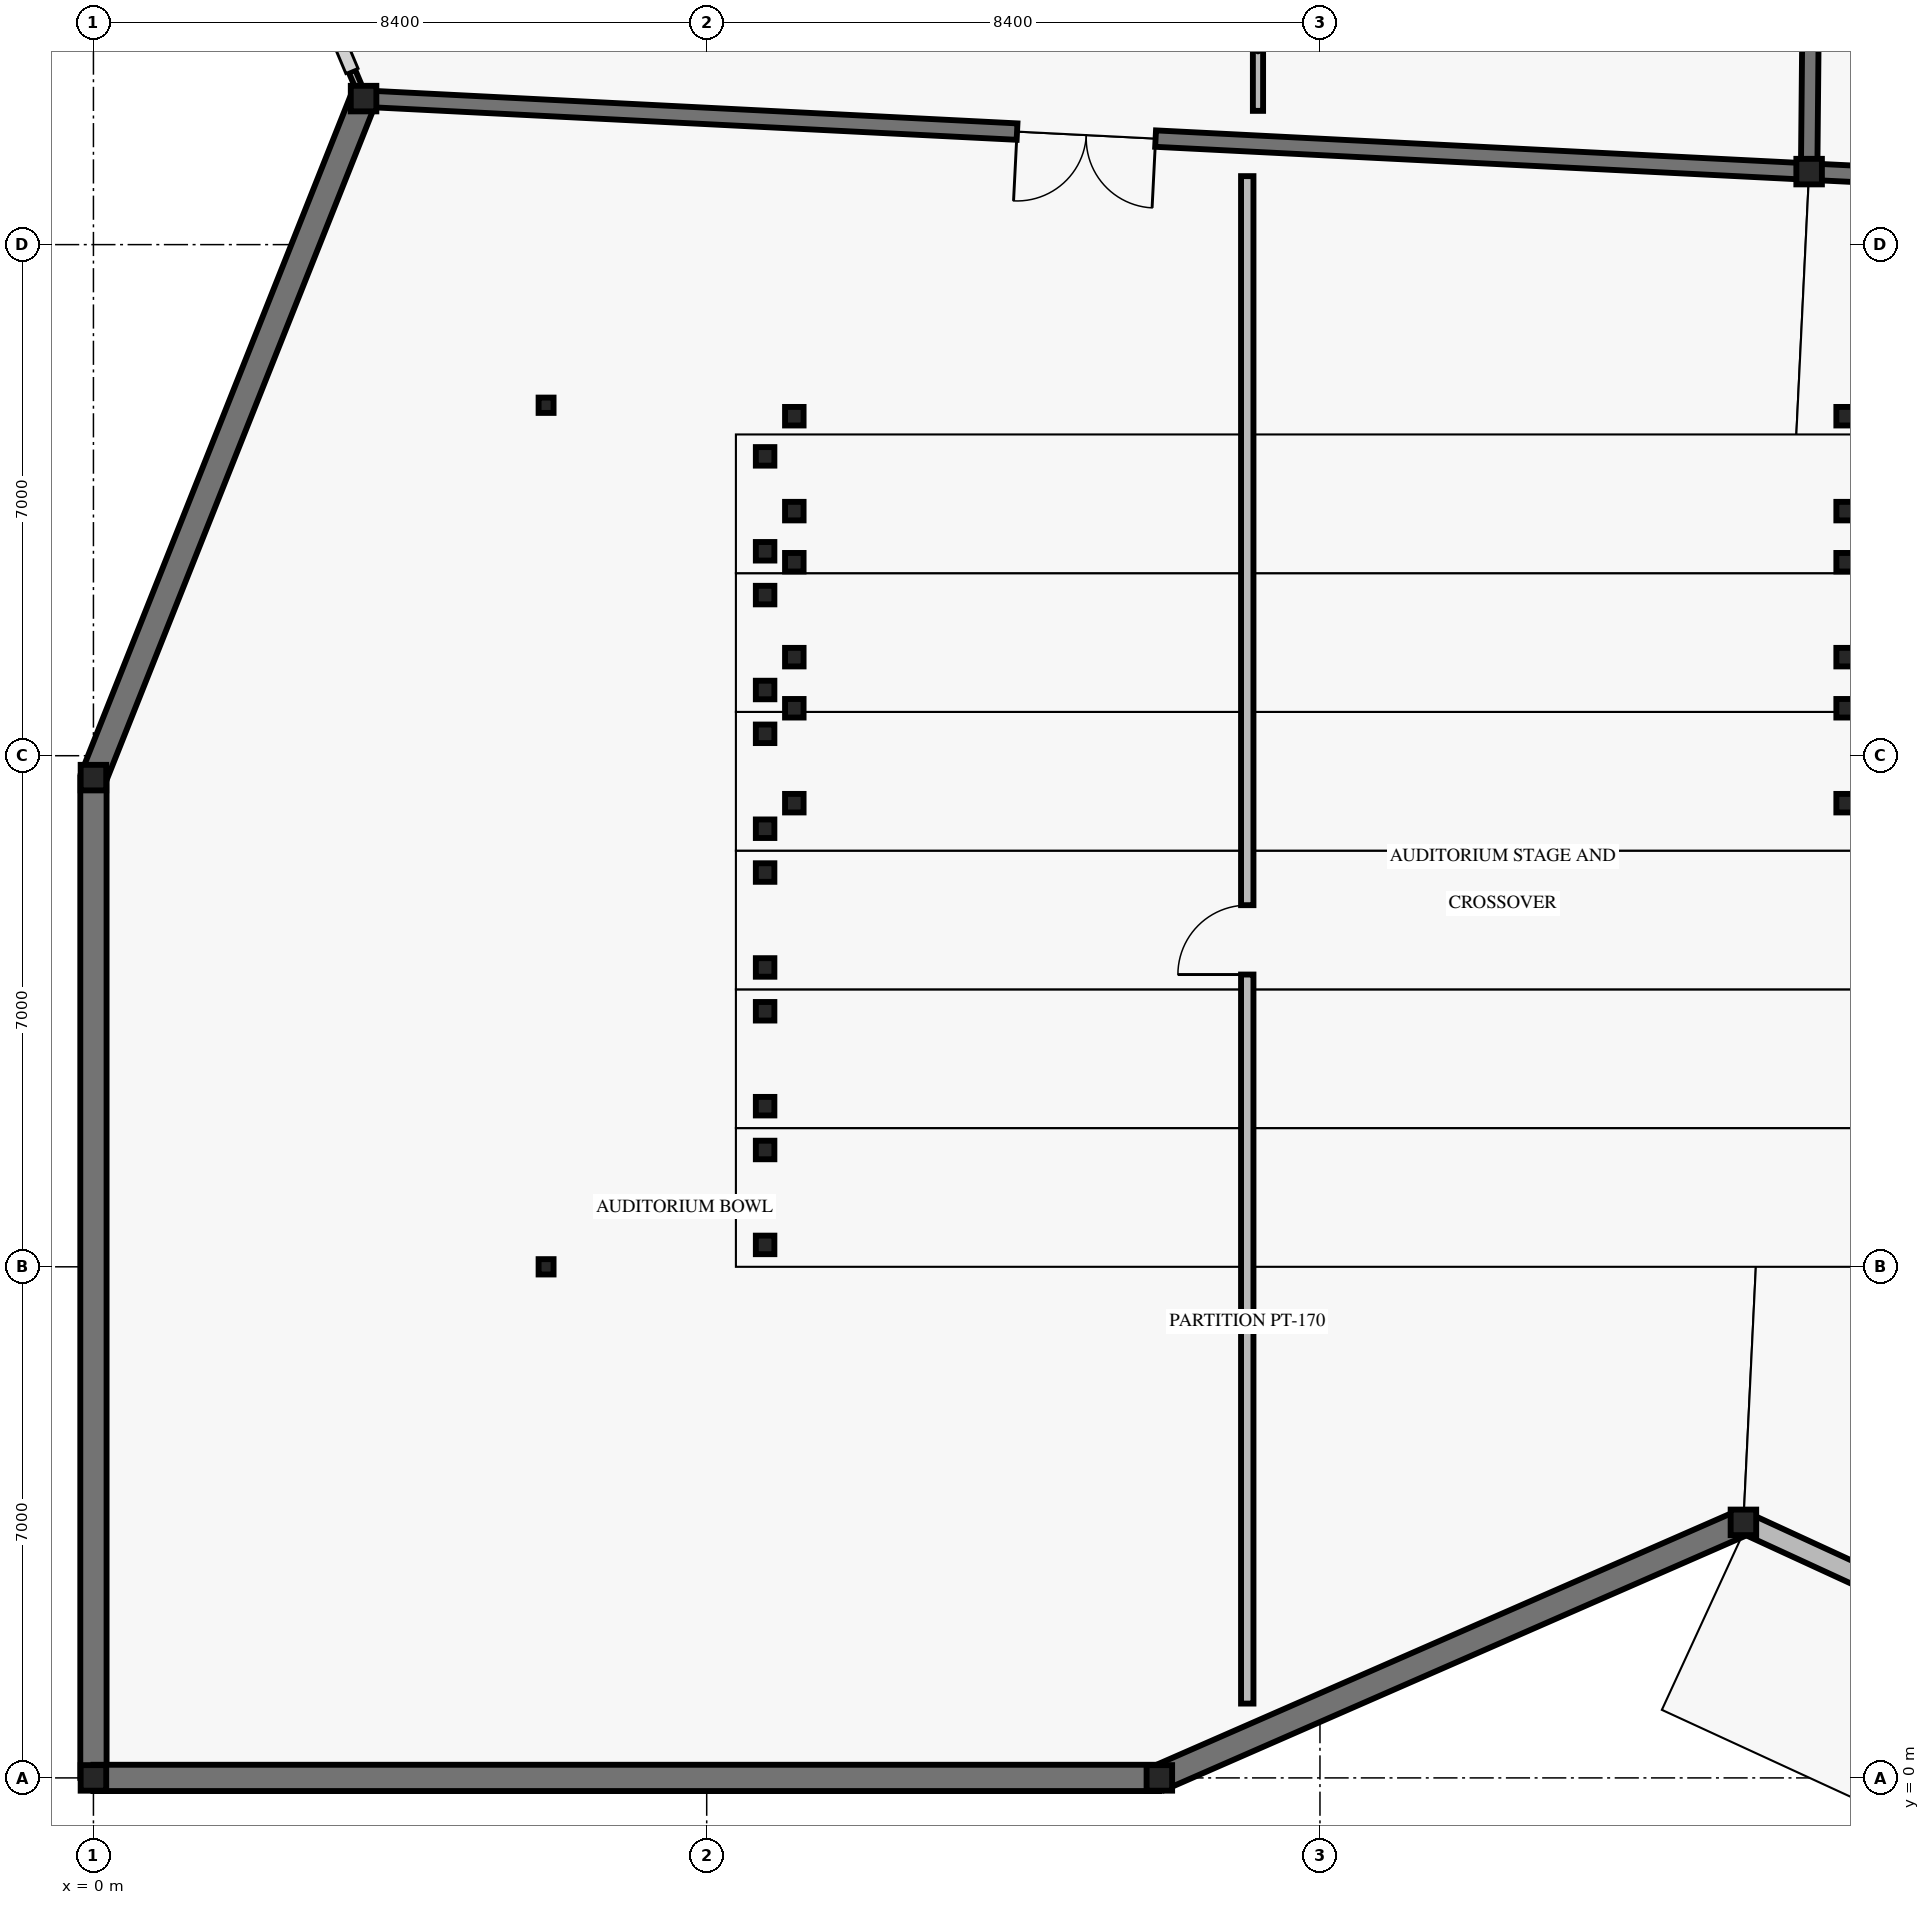
"""IFC4 building model, lengths in metres.
Left out: names, types, materials, properties, quantities, classifications, styles, units other than length and angle.
Written with IfcOpenShell. Run it as: python <this file> out.ifc"""

import sys

from ifc_helpers import new_model, si_unit, direction, frame, frame_2d, origin, origin_2d, place, context, subcontext, project, spatial, rectangle, i_section, extrude, element, fill, save


model = new_model("IFC4")
c1 = context("Model", 3, precision=1e-05, world=origin(), true_north=direction((0.0, 1.0)))
c2 = subcontext(c1, "Body", "Model", "MODEL_VIEW")
j1 = project(units=[si_unit("LENGTHUNIT", "METRE"), si_unit("PLANEANGLEUNIT", "RADIAN")], contexts=[c1])
p1 = place(None, origin())
s1 = spatial("IfcSite", under=j1, at=p1, CompositionType="ELEMENT")
p2 = place(p1, origin())
s2 = spatial("IfcBuilding", under=s1, at=p2, CompositionType="ELEMENT")
p3 = place(p2, origin())
s3 = spatial("IfcBuildingStorey", under=s2, at=p3, CompositionType="ELEMENT", Elevation=0.0)
for number, where, z_axis, x_axis in (
    (1, (0.0, 0.0, 0.0), (0.0, 0.0, 1.0), (1.0, 0.0, 0.0)),
    (2, (0.0, 13.7, 0.0), (0.0, 0.0, 1.0), (1.0, 0.0, 0.0)),
    (3, (3.7, 23.0, 0.0), (0.0, 0.0, 1.0), (1.0, 0.0, 0.0)),
    (4, (14.6, 0.0, 0.0), (0.0, 0.0, 1.0), (1.0, 0.0, 0.0)),
    (5, (22.6, 3.5, 0.0), (0.0, 0.0, 1.0), (1.0, 0.0, 0.0)),
    (6, (23.5, 22.0, 0.0), (0.0, 0.0, 1.0), (1.0, 0.0, 0.0)),
):
    element("IfcColumn", number, at=place(p3, frame(where, z_axis=z_axis, x_axis=x_axis)), inside=s3, PredefinedType="COLUMN", context=c2, shape_type="SweptSolid", body=[
        extrude(i_section(OverallWidth=0.35, OverallDepth=0.35, WebThickness=0.02, FlangeThickness=0.028, at=origin_2d()), origin(), (0.0, 0.0, 1.0), 5.4),
    ])
for number, where, z_axis, x_axis in (
    (7, (6.2, 7.0, 0.0), (0.0, 0.0, 1.0), (1.0, 0.0, 0.0)),
    (8, (6.2, 18.8, 0.0), (0.0, 0.0, 1.0), (1.0, 0.0, 0.0)),
):
    element("IfcColumn", number, at=place(p3, frame(where, z_axis=z_axis, x_axis=x_axis)), inside=s3, PredefinedType="COLUMN", context=c2, shape_type="SweptSolid", body=[
        extrude(i_section(OverallWidth=0.205, OverallDepth=0.21, WebThickness=0.009, FlangeThickness=0.014, FilletRadius=0.01, at=origin_2d()), origin(), (0.0, 0.0, 1.0), 5.4),
    ])
for number, where, z_axis, x_axis in (
    (9, (9.2, 7.3, 0.0), (0.0, 0.0, 1.0), (1.0, 0.0, 0.0)),
    (10, (9.2, 8.6, 0.0), (0.0, 0.0, 1.0), (1.0, 0.0, 0.0)),
):
    element("IfcColumn", number, at=place(p3, frame(where, z_axis=z_axis, x_axis=x_axis)), inside=s3, PredefinedType="COLUMN", context=c2, shape_type="SweptSolid", body=[
        extrude(i_section(OverallWidth=0.254, OverallDepth=0.254, WebThickness=0.009, FlangeThickness=0.014, FilletRadius=0.013, at=origin_2d()), origin(), (0.0, 0.0, 1.0), 0.255),
    ])
for number, where, z_axis, x_axis in (
    (11, (9.2, 9.2, 0.0), (0.0, 0.0, 1.0), (1.0, 0.0, 0.0)),
    (12, (9.2, 10.5, 0.0), (0.0, 0.0, 1.0), (1.0, 0.0, 0.0)),
):
    element("IfcColumn", number, at=place(p3, frame(where, z_axis=z_axis, x_axis=x_axis)), inside=s3, PredefinedType="COLUMN", context=c2, shape_type="SweptSolid", body=[
        extrude(i_section(OverallWidth=0.254, OverallDepth=0.254, WebThickness=0.009, FlangeThickness=0.014, FilletRadius=0.013, at=origin_2d()), origin(), (0.0, 0.0, 1.0), 0.675),
    ])
for number, where, z_axis, x_axis in (
    (13, (9.2, 11.1, 0.0), (0.0, 0.0, 1.0), (1.0, 0.0, 0.0)),
    (14, (9.2, 12.4, 0.0), (0.0, 0.0, 1.0), (1.0, 0.0, 0.0)),
):
    element("IfcColumn", number, at=place(p3, frame(where, z_axis=z_axis, x_axis=x_axis)), inside=s3, PredefinedType="COLUMN", context=c2, shape_type="SweptSolid", body=[
        extrude(i_section(OverallWidth=0.254, OverallDepth=0.254, WebThickness=0.009, FlangeThickness=0.014, FilletRadius=0.013, at=origin_2d()), origin(), (0.0, 0.0, 1.0), 1.095),
    ])
for number, where, z_axis, x_axis in (
    (15, (9.2, 13.0, 0.0), (0.0, 0.0, 1.0), (1.0, 0.0, 0.0)),
    (16, (9.2, 14.3, 0.0), (0.0, 0.0, 1.0), (1.0, 0.0, 0.0)),
):
    element("IfcColumn", number, at=place(p3, frame(where, z_axis=z_axis, x_axis=x_axis)), inside=s3, PredefinedType="COLUMN", context=c2, shape_type="SweptSolid", body=[
        extrude(i_section(OverallWidth=0.254, OverallDepth=0.254, WebThickness=0.009, FlangeThickness=0.014, FilletRadius=0.013, at=origin_2d()), origin(), (0.0, 0.0, 1.0), 1.515),
    ])
for number, where, z_axis, x_axis in (
    (17, (9.2, 14.9, 0.0), (0.0, 0.0, 1.0), (1.0, 0.0, 0.0)),
    (18, (9.2, 16.2, 0.0), (0.0, 0.0, 1.0), (1.0, 0.0, 0.0)),
):
    element("IfcColumn", number, at=place(p3, frame(where, z_axis=z_axis, x_axis=x_axis)), inside=s3, PredefinedType="COLUMN", context=c2, shape_type="SweptSolid", body=[
        extrude(i_section(OverallWidth=0.254, OverallDepth=0.254, WebThickness=0.009, FlangeThickness=0.014, FilletRadius=0.013, at=origin_2d()), origin(), (0.0, 0.0, 1.0), 1.935),
    ])
for number, where, z_axis, x_axis in (
    (19, (9.2, 16.8, 0.0), (0.0, 0.0, 1.0), (1.0, 0.0, 0.0)),
    (20, (9.2, 18.1, 0.0), (0.0, 0.0, 1.0), (1.0, 0.0, 0.0)),
):
    element("IfcColumn", number, at=place(p3, frame(where, z_axis=z_axis, x_axis=x_axis)), inside=s3, PredefinedType="COLUMN", context=c2, shape_type="SweptSolid", body=[
        extrude(i_section(OverallWidth=0.254, OverallDepth=0.254, WebThickness=0.009, FlangeThickness=0.014, FilletRadius=0.013, at=origin_2d()), origin(), (0.0, 0.0, 1.0), 2.355),
    ])
for number, where, z_axis, x_axis in (
    (21, (9.6, 13.35, 0.0), (0.0, 0.0, 1.0), (1.0, 0.0, 0.0)),
    (22, (9.6, 14.65, 0.0), (0.0, 0.0, 1.0), (1.0, 0.0, 0.0)),
    (23, (24.0, 13.35, 0.0), (0.0, 0.0, 1.0), (1.0, 0.0, 0.0)),
    (24, (24.0, 14.65, 0.0), (0.0, 0.0, 1.0), (1.0, 0.0, 0.0)),
    (25, (9.6, 15.35, 0.0), (0.0, 0.0, 1.0), (1.0, 0.0, 0.0)),
    (26, (9.6, 16.65, 0.0), (0.0, 0.0, 1.0), (1.0, 0.0, 0.0)),
    (27, (24.0, 15.35, 0.0), (0.0, 0.0, 1.0), (1.0, 0.0, 0.0)),
    (28, (24.0, 16.65, 0.0), (0.0, 0.0, 1.0), (1.0, 0.0, 0.0)),
    (29, (9.6, 17.35, 0.0), (0.0, 0.0, 1.0), (1.0, 0.0, 0.0)),
    (30, (9.6, 18.65, 0.0), (0.0, 0.0, 1.0), (1.0, 0.0, 0.0)),
    (31, (24.0, 17.35, 0.0), (0.0, 0.0, 1.0), (1.0, 0.0, 0.0)),
    (32, (24.0, 18.65, 0.0), (0.0, 0.0, 1.0), (1.0, 0.0, 0.0)),
):
    element("IfcColumn", number, at=place(p3, frame(where, z_axis=z_axis, x_axis=x_axis)), inside=s3, PredefinedType="COLUMN", context=c2, shape_type="SweptSolid", body=[
        extrude(i_section(OverallWidth=0.254, OverallDepth=0.254, WebThickness=0.009, FlangeThickness=0.014, FilletRadius=0.013, at=origin_2d()), origin(), (0.0, 0.0, 1.0), 5.4),
    ])
p4 = place(p3, frame((0.0, 13.7, 0.0), z_axis=(0.0, 0.0, 1.0), x_axis=(0.36968498985, 0.929157149399, 0.0)))
e33 = element("IfcWall", 33, at=p4, inside=s3, PredefinedType="SOLIDWALL", context=c2, shape_type="SweptSolid", body=[
    extrude(rectangle(XDim=9.949, YDim=0.36, at=frame_2d((4.975, 0.0))), origin(), (0.0, 0.0, 1.0), 4.22),
])
p5 = place(p3, frame((0.0, 0.0, 0.0), z_axis=(0.0, 0.0, 1.0), x_axis=(0.0, 1.0, 0.0)))
e34 = element("IfcWall", 34, at=p5, inside=s3, PredefinedType="SOLIDWALL", context=c2, shape_type="SweptSolid", body=[
    extrude(rectangle(XDim=13.7, YDim=0.36, at=frame_2d((6.85, 0.0))), origin(), (0.0, 0.0, 1.0), 4.22),
])
p6 = place(p3, frame((14.6, 0.0, 0.0), z_axis=(0.0, 0.0, 1.0), x_axis=(-1.0, 0.0, 0.0)))
e35 = element("IfcWall", 35, at=p6, inside=s3, PredefinedType="SOLIDWALL", context=c2, shape_type="SweptSolid", body=[
    extrude(rectangle(XDim=14.6, YDim=0.36, at=frame_2d((7.3, 0.0))), origin(), (0.0, 0.0, 1.0), 4.22),
])
p7 = place(p3, frame((22.545, 3.476, 0.0), z_axis=(0.0, 0.0, 1.0), x_axis=(-0.916148288852, -0.400839510069, 0.0)))
e36 = element("IfcWall", 36, at=p7, inside=s3, PredefinedType="SOLIDWALL", context=c2, shape_type="SweptSolid", body=[
    extrude(rectangle(XDim=8.672, YDim=0.36, at=frame_2d((4.336, 0.0))), origin(), (0.0, 0.0, 1.0), 4.22),
])
p8 = place(p3, frame((30.2, 0.0, 0.0), z_axis=(0.0, 0.0, 1.0), x_axis=(-0.90830827854, 0.418301411827, 0.0)))
e37 = element("IfcWall", 37, at=p8, inside=s3, PredefinedType="SOLIDWALL", context=c2, shape_type="SweptSolid", body=[
    extrude(rectangle(XDim=8.308, YDim=0.29, at=frame_2d((4.154, 0.0))), origin(), (0.0, 0.0, 1.0), 4.22),
])
p9 = place(p8, frame((2.854, 0.0, 0.0)))
e38 = element("IfcOpeningElement", 38, at=p9, cuts=e37, PredefinedType="OPENING", context=c2, shape_type="SweptSolid", body=[
    extrude(rectangle(XDim=2.6, YDim=2.55, at=frame_2d((1.3, 1.275))), frame((0.0, 0.155, 0.0), z_axis=(0.0, -1.0, 0.0), x_axis=(1.0, 0.0, 0.0)), (0.0, 0.0, 1.0), 0.31),
])
p10 = place(p3, frame((3.661, 23.094, 0.0), z_axis=(0.0, 0.0, 1.0), x_axis=(-0.38894215718, 0.921262176782, 0.0)))
e39 = element("IfcWall", 39, at=p10, inside=s3, PredefinedType="SOLIDWALL", context=c2, shape_type="SweptSolid", body=[
    extrude(rectangle(XDim=0.308, YDim=0.095, at=frame_2d((0.154, 0.0))), origin(), (0.0, 0.0, 1.0), 4.22),
])
p11 = place(p3, frame((23.5, 22.0, 0.0), z_axis=(0.0, 0.0, 1.0), x_axis=(-0.99872706092, 0.050440636263, 0.0)))
e40 = element("IfcWall", 40, at=p11, inside=s3, PredefinedType="SOLIDWALL", context=c2, shape_type="SweptSolid", body=[
    extrude(rectangle(XDim=19.825, YDim=0.225, at=frame_2d((9.913, 0.0))), origin(), (0.0, 0.0, 1.0), 4.62),
])
p12 = place(p11, frame((8.963, 0.0, 0.0)))
e41 = element("IfcOpeningElement", 41, at=p12, cuts=e40, PredefinedType="OPENING", context=c2, shape_type="SweptSolid", body=[
    extrude(rectangle(XDim=1.9, YDim=2.35, at=frame_2d((0.95, 1.175))), frame((0.0, 0.123, 0.0), z_axis=(0.0, -1.0, 0.0), x_axis=(1.0, 0.0, 0.0)), (0.0, 0.0, 1.0), 0.245),
])
p13 = place(p3, frame((43.8, 21.0, 0.0), z_axis=(0.0, 0.0, 1.0), x_axis=(-0.998788882418, 0.049201304434, 0.0)))
e42 = element("IfcWall", 42, at=p13, inside=s3, PredefinedType="SOLIDWALL", context=c2, shape_type="SweptSolid", body=[
    extrude(rectangle(XDim=20.325, YDim=0.225, at=frame_2d((10.162, 0.0))), origin(), (0.0, 0.0, 1.0), 4.62),
])
p14 = place(p13, frame((9.212, 0.0, 0.0)))
e43 = element("IfcOpeningElement", 43, at=p14, cuts=e42, PredefinedType="OPENING", context=c2, shape_type="SweptSolid", body=[
    extrude(rectangle(XDim=1.9, YDim=2.35, at=frame_2d((0.95, 1.175))), frame((0.0, 0.123, 0.0), z_axis=(0.0, -1.0, 0.0), x_axis=(1.0, 0.0, 0.0)), (0.0, 0.0, 1.0), 0.245),
])
p15 = place(p3, frame((23.5, 22.0, 0.0), z_axis=(0.0, 0.0, 1.0), x_axis=(0.009521052802, 0.99995467375, 0.0)))
e44 = element("IfcWall", 44, at=p15, inside=s3, PredefinedType="SOLIDWALL", context=c2, shape_type="SweptSolid", body=[
    extrude(rectangle(XDim=21.001, YDim=0.225, at=frame_2d((10.5, 0.0))), origin(), (0.0, 0.0, 1.0), 4.62),
])
p16 = place(p15, frame((9.575, 0.0, 0.0)))
e45 = element("IfcOpeningElement", 45, at=p16, cuts=e44, PredefinedType="OPENING", context=c2, shape_type="SweptSolid", body=[
    extrude(rectangle(XDim=1.85, YDim=2.4, at=frame_2d((0.925, 1.2))), frame((0.0, 0.123, 0.0), z_axis=(0.0, -1.0, 0.0), x_axis=(1.0, 0.0, 0.0)), (0.0, 0.0, 1.0), 0.245),
])
p17 = place(p3, frame((15.804, 1.018, 0.0), z_axis=(0.0, 0.0, 1.0), x_axis=(0.0, 1.0, 0.0)))
e46 = element("IfcWall", 46, at=p17, inside=s3, PredefinedType="PARTITIONING", context=c2, shape_type="SweptSolid", body=[
    extrude(rectangle(XDim=20.92, YDim=0.17, at=frame_2d((10.46, 0.0))), origin(), (0.0, 0.0, 1.0), 3.92),
])
p18 = place(p17, frame((9.985, 0.0, 0.0)))
e47 = element("IfcOpeningElement", 47, at=p18, cuts=e46, PredefinedType="OPENING", context=c2, shape_type="SweptSolid", body=[
    extrude(rectangle(XDim=0.95, YDim=2.15, at=frame_2d((0.475, 1.075))), frame((0.0, 0.095, 0.0), z_axis=(0.0, -1.0, 0.0), x_axis=(1.0, 0.0, 0.0)), (0.0, 0.0, 1.0), 0.19),
])
p19 = place(p3, frame((15.951, 22.832, 0.0), z_axis=(0.0, 0.0, 1.0), x_axis=(0.0, 1.0, 0.0)))
e48 = element("IfcWall", 48, at=p19, inside=s3, PredefinedType="PARTITIONING", context=c2, shape_type="SweptSolid", body=[
    extrude(rectangle(XDim=5.568, YDim=0.14, at=frame_2d((2.784, 0.0))), origin(), (0.0, 0.0, 1.0), 3.92),
])
p20 = place(p19, frame((2.259, 0.0, 0.0)))
e49 = element("IfcOpeningElement", 49, at=p20, cuts=e48, PredefinedType="OPENING", context=c2, shape_type="SweptSolid", body=[
    extrude(rectangle(XDim=1.05, YDim=2.2, at=frame_2d((0.525, 1.1))), frame((0.0, 0.08, 0.0), z_axis=(0.0, -1.0, 0.0), x_axis=(1.0, 0.0, 0.0)), (0.0, 0.0, 1.0), 0.16),
])
p21 = place(p12, origin())
e50 = element("IfcDoor", 50, at=p21, inside=s3, OperationType="DOUBLE_DOOR_SINGLE_SWING", PredefinedType="DOOR", context=c2, shape_type="SweptSolid", body=[
    extrude(rectangle(XDim=1.9, YDim=2.35, at=frame_2d((0.95, 1.175))), frame((0.0, 0.025, 0.0), z_axis=(0.0, -1.0, 0.0), x_axis=(1.0, 0.0, 0.0)), (0.0, 0.0, 1.0), 0.05),
])
fill(e41, e50)
p22 = place(p18, origin())
e51 = element("IfcDoor", 51, at=p22, inside=s3, OperationType="SINGLE_SWING_LEFT", PredefinedType="DOOR", context=c2, shape_type="SweptSolid", body=[
    extrude(rectangle(XDim=0.95, YDim=2.15, at=frame_2d((0.475, 1.075))), frame((0.0, 0.025, 0.0), z_axis=(0.0, -1.0, 0.0), x_axis=(1.0, 0.0, 0.0)), (0.0, 0.0, 1.0), 0.05),
])
fill(e47, e51)
save(model, sys.argv[1])
